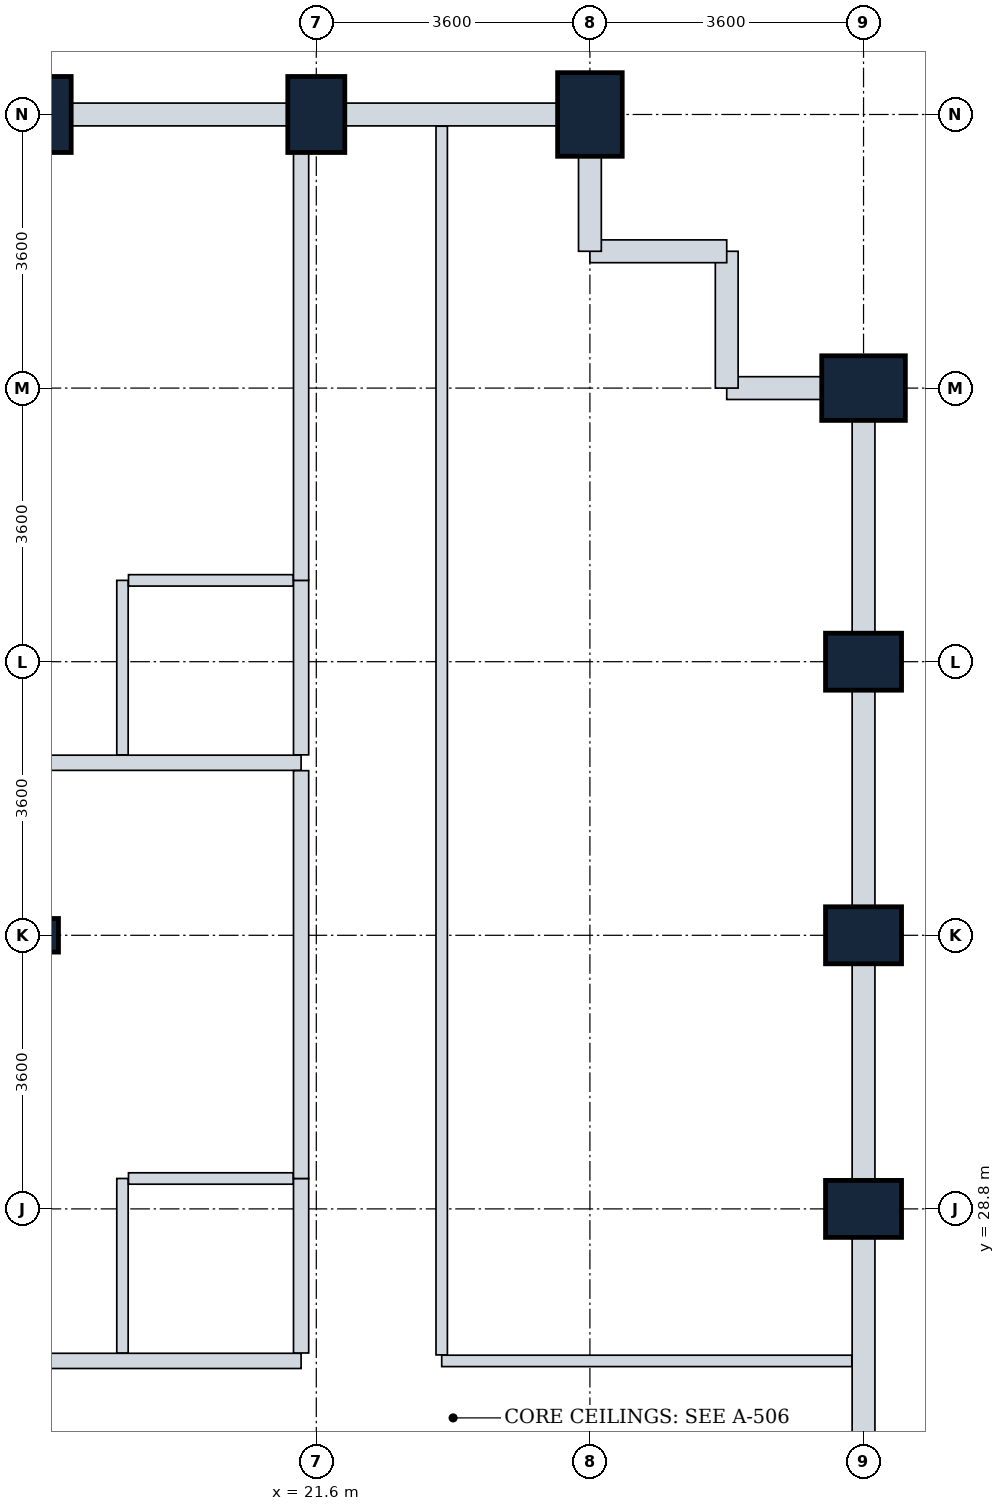
"""IFC4 building model, lengths in metres.
Left out: names, types, materials, properties, quantities, classifications, styles, units other than length and angle.
Written with IfcOpenShell. Run it as: python <this file> out.ifc"""

import sys

from ifc_helpers import new_model, si_unit, direction, frame, frame_2d, origin, origin_2d, place, context, subcontext, project, spatial, rectangle, i_section, extrude, element, fill, save


model = new_model("IFC4")
c1 = context("Model", 3, precision=1e-05, world=origin(), true_north=direction((0.0, 1.0)))
c2 = subcontext(c1, "Body", "Model", "MODEL_VIEW")
j1 = project(units=[si_unit("LENGTHUNIT", "METRE"), si_unit("PLANEANGLEUNIT", "RADIAN")], contexts=[c1])
p1 = place(None, origin())
s1 = spatial("IfcSite", under=j1, at=p1, CompositionType="ELEMENT")
p2 = place(p1, origin())
s2 = spatial("IfcBuilding", under=s1, at=p2, CompositionType="ELEMENT")
p3 = place(p2, frame((0.0, 0.0, 139.0)))
s3 = spatial("IfcBuildingStorey", under=s2, at=p3, CompositionType="ELEMENT", Elevation=139.0)
p4 = place(p3, frame((18.0, 32.4, 0.0), z_axis=(0.0, 0.0, 1.0), x_axis=(1.0, 0.0, 0.0)))
e1 = element("IfcColumn", 1, at=p4, inside=s3, PredefinedType="COLUMN", context=c2, shape_type="SweptSolid", body=[
    extrude(i_section(OverallWidth=0.416, OverallDepth=0.442, WebThickness=0.025, FlangeThickness=0.041, FilletRadius=0.015, at=origin_2d()), origin(), (0.0, 0.0, 1.0), 3.8),
])
for number, where, z_axis, x_axis in (
    (2, (18.0, 43.2, 0.0), (0.0, 0.0, 1.0), (1.0, 0.0, 0.0)),
    (3, (21.6, 43.2, 0.0), (0.0, 0.0, 1.0), (1.0, 0.0, 0.0)),
):
    element("IfcColumn", number, at=place(p3, frame(where, z_axis=z_axis, x_axis=x_axis)), inside=s3, PredefinedType="COLUMN", context=c2, shape_type="SweptSolid", body=[
        extrude(rectangle(XDim=0.75, YDim=1.0, at=origin_2d()), origin(), (0.0, 0.0, 1.0), 3.8),
    ])
p5 = place(p3, frame((25.2, 43.2, 0.0), z_axis=(0.0, 0.0, 1.0), x_axis=(1.0, 0.0, 0.0)))
e4 = element("IfcColumn", 4, at=p5, inside=s3, PredefinedType="COLUMN", context=c2, shape_type="SweptSolid", body=[
    extrude(rectangle(XDim=0.85, YDim=1.1, at=origin_2d()), origin(), (0.0, 0.0, 1.0), 3.8),
])
for number, where, z_axis, x_axis in (
    (5, (28.8, 28.8, 0.0), (0.0, 0.0, 1.0), (0.0, 1.0, 0.0)),
    (6, (28.8, 32.4, 0.0), (0.0, 0.0, 1.0), (0.0, 1.0, 0.0)),
    (7, (28.8, 36.0, 0.0), (0.0, 0.0, 1.0), (0.0, 1.0, 0.0)),
):
    element("IfcColumn", number, at=place(p3, frame(where, z_axis=z_axis, x_axis=x_axis)), inside=s3, PredefinedType="COLUMN", context=c2, shape_type="SweptSolid", body=[
        extrude(rectangle(XDim=0.75, YDim=1.0, at=origin_2d()), origin(), (0.0, 0.0, 1.0), 3.8),
    ])
p6 = place(p3, frame((28.8, 39.6, 0.0), z_axis=(0.0, 0.0, 1.0), x_axis=(0.0, 1.0, 0.0)))
e8 = element("IfcColumn", 8, at=p6, inside=s3, PredefinedType="COLUMN", context=c2, shape_type="SweptSolid", body=[
    extrude(rectangle(XDim=0.85, YDim=1.1, at=origin_2d()), origin(), (0.0, 0.0, 1.0), 3.8),
])
p7 = place(p3, frame((28.8, 28.8, 0.0), z_axis=(0.0, 0.0, 1.0), x_axis=(0.0, -1.0, 0.0)))
e9 = element("IfcWall", 9, at=p7, inside=s3, PredefinedType="STANDARD", context=c2, shape_type="SweptSolid", body=[
    extrude(rectangle(XDim=3.6, YDim=0.3, at=frame_2d((1.8, 0.0))), origin(), (0.0, 0.0, 1.0), 3.17),
])
p8 = place(p3, frame((28.8, 32.4, 0.0), z_axis=(0.0, 0.0, 1.0), x_axis=(0.0, -1.0, 0.0)))
e10 = element("IfcWall", 10, at=p8, inside=s3, PredefinedType="STANDARD", context=c2, shape_type="SweptSolid", body=[
    extrude(rectangle(XDim=3.6, YDim=0.3, at=frame_2d((1.8, 0.0))), origin(), (0.0, 0.0, 1.0), 2.93),
])
p9 = place(p8, frame((0.75, 0.0, 0.85)))
e11 = element("IfcOpeningElement", 11, at=p9, cuts=e10, PredefinedType="OPENING", context=c2, shape_type="SweptSolid", body=[
    extrude(rectangle(XDim=2.1, YDim=1.35, at=frame_2d((1.05, 0.675))), frame((0.0, 0.16, 0.0), z_axis=(0.0, -1.0, 0.0), x_axis=(1.0, 0.0, 0.0)), (0.0, 0.0, 1.0), 0.32),
])
p10 = place(p3, frame((28.8, 36.0, 0.0), z_axis=(0.0, 0.0, 1.0), x_axis=(0.0, -1.0, 0.0)))
e12 = element("IfcWall", 12, at=p10, inside=s3, PredefinedType="STANDARD", context=c2, shape_type="SweptSolid", body=[
    extrude(rectangle(XDim=3.6, YDim=0.3, at=frame_2d((1.8, 0.0))), origin(), (0.0, 0.0, 1.0), 2.93),
])
p11 = place(p10, frame((0.75, 0.0, 0.85)))
e13 = element("IfcOpeningElement", 13, at=p11, cuts=e12, PredefinedType="OPENING", context=c2, shape_type="SweptSolid", body=[
    extrude(rectangle(XDim=2.1, YDim=1.35, at=frame_2d((1.05, 0.675))), frame((0.0, 0.16, 0.0), z_axis=(0.0, -1.0, 0.0), x_axis=(1.0, 0.0, 0.0)), (0.0, 0.0, 1.0), 0.32),
])
p12 = place(p3, frame((28.8, 39.6, 0.0), z_axis=(0.0, 0.0, 1.0), x_axis=(0.0, -1.0, 0.0)))
e14 = element("IfcWall", 14, at=p12, inside=s3, PredefinedType="STANDARD", context=c2, shape_type="SweptSolid", body=[
    extrude(rectangle(XDim=3.6, YDim=0.3, at=frame_2d((1.8, 0.0))), origin(), (0.0, 0.0, 1.0), 2.93),
])
p13 = place(p12, frame((0.775, 0.0, 0.85)))
e15 = element("IfcOpeningElement", 15, at=p13, cuts=e14, PredefinedType="OPENING", context=c2, shape_type="SweptSolid", body=[
    extrude(rectangle(XDim=2.1, YDim=1.35, at=frame_2d((1.05, 0.675))), frame((0.0, 0.16, 0.0), z_axis=(0.0, -1.0, 0.0), x_axis=(1.0, 0.0, 0.0)), (0.0, 0.0, 1.0), 0.32),
])
p14 = place(p3, frame((27.0, 39.6, 0.0), z_axis=(0.0, 0.0, 1.0), x_axis=(1.0, 0.0, 0.0)))
e16 = element("IfcWall", 16, at=p14, inside=s3, PredefinedType="STANDARD", context=c2, shape_type="SweptSolid", body=[
    extrude(rectangle(XDim=1.8, YDim=0.3, at=frame_2d((0.9, 0.0))), origin(), (0.0, 0.0, 1.0), 2.93),
])
p15 = place(p3, frame((27.0, 39.6, 0.0), z_axis=(0.0, 0.0, 1.0), x_axis=(0.0, 1.0, 0.0)))
e17 = element("IfcWall", 17, at=p15, inside=s3, PredefinedType="STANDARD", context=c2, shape_type="SweptSolid", body=[
    extrude(rectangle(XDim=1.8, YDim=0.3, at=frame_2d((0.9, 0.0))), origin(), (0.0, 0.0, 1.0), 3.535),
])
p16 = place(p3, frame((25.2, 41.4, 0.0), z_axis=(0.0, 0.0, 1.0), x_axis=(1.0, 0.0, 0.0)))
e18 = element("IfcWall", 18, at=p16, inside=s3, PredefinedType="STANDARD", context=c2, shape_type="SweptSolid", body=[
    extrude(rectangle(XDim=1.8, YDim=0.3, at=frame_2d((0.9, 0.0))), origin(), (0.0, 0.0, 1.0), 3.535),
])
p17 = place(p3, frame((25.2, 41.4, 0.0), z_axis=(0.0, 0.0, 1.0), x_axis=(0.0, 1.0, 0.0)))
e19 = element("IfcWall", 19, at=p17, inside=s3, PredefinedType="STANDARD", context=c2, shape_type="SweptSolid", body=[
    extrude(rectangle(XDim=1.8, YDim=0.3, at=frame_2d((0.9, 0.0))), origin(), (0.0, 0.0, 1.0), 2.93),
])
p18 = place(p3, frame((21.6, 43.2, 0.0), z_axis=(0.0, 0.0, 1.0), x_axis=(1.0, 0.0, 0.0)))
e20 = element("IfcWall", 20, at=p18, inside=s3, PredefinedType="STANDARD", context=c2, shape_type="SweptSolid", body=[
    extrude(rectangle(XDim=3.6, YDim=0.3, at=frame_2d((1.8, 0.0))), origin(), (0.0, 0.0, 1.0), 2.93),
])
p19 = place(p3, frame((18.0, 43.2, 0.0), z_axis=(0.0, 0.0, 1.0), x_axis=(1.0, 0.0, 0.0)))
e21 = element("IfcWall", 21, at=p19, inside=s3, PredefinedType="STANDARD", context=c2, shape_type="SweptSolid", body=[
    extrude(rectangle(XDim=3.6, YDim=0.3, at=frame_2d((1.8, 0.0))), origin(), (0.0, 0.0, 1.0), 2.93),
])
p20 = place(p19, frame((0.75, 0.0, 0.85)))
e22 = element("IfcOpeningElement", 22, at=p20, cuts=e21, PredefinedType="OPENING", context=c2, shape_type="SweptSolid", body=[
    extrude(rectangle(XDim=2.1, YDim=1.35, at=frame_2d((1.05, 0.675))), frame((0.0, 0.16, 0.0), z_axis=(0.0, -1.0, 0.0), x_axis=(1.0, 0.0, 0.0)), (0.0, 0.0, 1.0), 0.32),
])
for number, where, z_axis, x_axis in (
    (23, (7.354, 26.8, 0.0), (0.0, 0.0, 1.0), (1.0, 0.0, 0.0)),
    (24, (7.354, 34.67, 0.0), (0.0, 0.0, 1.0), (1.0, 0.0, 0.0)),
):
    element("IfcWall", number, at=place(p3, frame(where, z_axis=z_axis, x_axis=x_axis)), inside=s3, PredefinedType="PARTITIONING", context=c2, shape_type="SweptSolid", body=[
        extrude(rectangle(XDim=14.046, YDim=0.2, at=frame_2d((7.023, 0.0))), origin(), (0.0, 0.0, 1.0), 2.93),
    ])
p21 = place(p3, frame((21.4, 26.904, 0.0), z_axis=(0.0, 0.0, 1.0), x_axis=(0.0, 1.0, 0.0)))
e25 = element("IfcWall", 25, at=p21, inside=s3, PredefinedType="PARTITIONING", context=c2, shape_type="SweptSolid", body=[
    extrude(rectangle(XDim=2.296, YDim=0.2, at=frame_2d((1.148, 0.0))), origin(), (0.0, 0.0, 1.0), 3.13),
])
p22 = place(p3, frame((19.05, 26.904, 0.0), z_axis=(0.0, 0.0, 1.0), x_axis=(0.0, 1.0, 0.0)))
e26 = element("IfcWall", 26, at=p22, inside=s3, PredefinedType="PARTITIONING", context=c2, shape_type="SweptSolid", body=[
    extrude(rectangle(XDim=2.296, YDim=0.15, at=frame_2d((1.148, 0.0))), origin(), (0.0, 0.0, 1.0), 3.17),
])
p23 = place(p3, frame((19.129, 29.2, 0.0), z_axis=(0.0, 0.0, 1.0), x_axis=(1.0, 0.0, 0.0)))
e27 = element("IfcWall", 27, at=p23, inside=s3, PredefinedType="PARTITIONING", context=c2, shape_type="SweptSolid", body=[
    extrude(rectangle(XDim=2.167, YDim=0.15, at=frame_2d((1.083, 0.0))), origin(), (0.0, 0.0, 1.0), 3.535),
])
p24 = place(p23, frame((0.641, 0.0, 0.0)))
e28 = element("IfcOpeningElement", 28, at=p24, cuts=e27, PredefinedType="OPENING", context=c2, shape_type="SweptSolid", body=[
    extrude(rectangle(XDim=0.85, YDim=2.1, at=frame_2d((0.425, 1.05))), frame((0.0, 0.085, 0.0), z_axis=(0.0, -1.0, 0.0), x_axis=(1.0, 0.0, 0.0)), (0.0, 0.0, 1.0), 0.17),
])
p25 = place(p3, frame((21.4, 29.2, 0.0), z_axis=(0.0, 0.0, 1.0), x_axis=(0.0, 1.0, 0.0)))
e29 = element("IfcWall", 29, at=p25, inside=s3, PredefinedType="PARTITIONING", context=c2, shape_type="SweptSolid", body=[
    extrude(rectangle(XDim=5.366, YDim=0.2, at=frame_2d((2.683, 0.0))), origin(), (0.0, 0.0, 1.0), 3.13),
])
p26 = place(p25, frame((1.557, 0.0, 0.0)))
e30 = element("IfcOpeningElement", 30, at=p26, cuts=e29, PredefinedType="OPENING", context=c2, shape_type="SweptSolid", body=[
    extrude(rectangle(XDim=1.0, YDim=2.1, at=frame_2d((0.5, 1.05))), frame((0.0, 0.11, 0.0), z_axis=(0.0, -1.0, 0.0), x_axis=(1.0, 0.0, 0.0)), (0.0, 0.0, 1.0), 0.22),
])
p27 = place(p3, frame((21.4, 34.774, 0.0), z_axis=(0.0, 0.0, 1.0), x_axis=(0.0, 1.0, 0.0)))
e31 = element("IfcWall", 31, at=p27, inside=s3, PredefinedType="PARTITIONING", context=c2, shape_type="SweptSolid", body=[
    extrude(rectangle(XDim=2.296, YDim=0.2, at=frame_2d((1.148, 0.0))), origin(), (0.0, 0.0, 1.0), 3.17),
])
p28 = place(p3, frame((19.05, 34.774, 0.0), z_axis=(0.0, 0.0, 1.0), x_axis=(0.0, 1.0, 0.0)))
e32 = element("IfcWall", 32, at=p28, inside=s3, PredefinedType="PARTITIONING", context=c2, shape_type="SweptSolid", body=[
    extrude(rectangle(XDim=2.296, YDim=0.15, at=frame_2d((1.148, 0.0))), origin(), (0.0, 0.0, 1.0), 3.17),
])
p29 = place(p3, frame((19.129, 37.07, 0.0), z_axis=(0.0, 0.0, 1.0), x_axis=(1.0, 0.0, 0.0)))
e33 = element("IfcWall", 33, at=p29, inside=s3, PredefinedType="PARTITIONING", context=c2, shape_type="SweptSolid", body=[
    extrude(rectangle(XDim=2.167, YDim=0.15, at=frame_2d((1.083, 0.0))), origin(), (0.0, 0.0, 1.0), 3.535),
])
p30 = place(p29, frame((0.641, 0.0, 0.0)))
e34 = element("IfcOpeningElement", 34, at=p30, cuts=e33, PredefinedType="OPENING", context=c2, shape_type="SweptSolid", body=[
    extrude(rectangle(XDim=0.85, YDim=2.1, at=frame_2d((0.425, 1.05))), frame((0.0, 0.085, 0.0), z_axis=(0.0, -1.0, 0.0), x_axis=(1.0, 0.0, 0.0)), (0.0, 0.0, 1.0), 0.17),
])
p31 = place(p3, frame((21.4, 37.07, 0.0), z_axis=(0.0, 0.0, 1.0), x_axis=(0.0, 1.0, 0.0)))
e35 = element("IfcWall", 35, at=p31, inside=s3, PredefinedType="PARTITIONING", context=c2, shape_type="SweptSolid", body=[
    extrude(rectangle(XDim=5.976, YDim=0.2, at=frame_2d((2.988, 0.0))), origin(), (0.0, 0.0, 1.0), 2.93),
])
p32 = place(p31, frame((1.226, 0.0, 0.0)))
e36 = element("IfcOpeningElement", 36, at=p32, cuts=e35, PredefinedType="OPENING", context=c2, shape_type="SweptSolid", body=[
    extrude(rectangle(XDim=1.0, YDim=2.1, at=frame_2d((0.5, 1.05))), frame((0.0, 0.11, 0.0), z_axis=(0.0, -1.0, 0.0), x_axis=(1.0, 0.0, 0.0)), (0.0, 0.0, 1.0), 0.22),
])
p33 = place(p3, frame((23.25, 26.8, 0.0), z_axis=(0.0, 0.0, 1.0), x_axis=(1.0, 0.0, 0.0)))
e37 = element("IfcWall", 37, at=p33, inside=s3, PredefinedType="PARTITIONING", context=c2, shape_type="SweptSolid", body=[
    extrude(rectangle(XDim=5.396, YDim=0.15, at=frame_2d((2.698, 0.0))), origin(), (0.0, 0.0, 1.0), 3.535),
])
p34 = place(p3, frame((23.25, 26.879, 0.0), z_axis=(0.0, 0.0, 1.0), x_axis=(0.0, 1.0, 0.0)))
e38 = element("IfcWall", 38, at=p34, inside=s3, PredefinedType="PARTITIONING", context=c2, shape_type="SweptSolid", body=[
    extrude(rectangle(XDim=16.167, YDim=0.15, at=frame_2d((8.083, 0.0))), origin(), (0.0, 0.0, 1.0), 2.93),
])
p35 = place(p34, frame((7.621, 0.0, 0.0)))
e39 = element("IfcOpeningElement", 39, at=p35, cuts=e38, PredefinedType="OPENING", context=c2, shape_type="SweptSolid", body=[
    extrude(rectangle(XDim=1.0, YDim=2.1, at=frame_2d((0.5, 1.05))), frame((0.0, 0.085, 0.0), z_axis=(0.0, -1.0, 0.0), x_axis=(1.0, 0.0, 0.0)), (0.0, 0.0, 1.0), 0.17),
])
p36 = place(p9, origin())
e40 = element("IfcWindow", 40, at=p36, inside=s3, PartitioningType="SINGLE_PANEL", PredefinedType="WINDOW", context=c2, shape_type="SweptSolid", body=[
    extrude(rectangle(XDim=2.1, YDim=1.35, at=frame_2d((1.05, 0.675))), frame((0.0, 0.03, 0.0), z_axis=(0.0, -1.0, 0.0), x_axis=(1.0, 0.0, 0.0)), (0.0, 0.0, 1.0), 0.06),
])
fill(e11, e40)
p37 = place(p11, origin())
e41 = element("IfcWindow", 41, at=p37, inside=s3, PartitioningType="SINGLE_PANEL", PredefinedType="WINDOW", context=c2, shape_type="SweptSolid", body=[
    extrude(rectangle(XDim=2.1, YDim=1.35, at=frame_2d((1.05, 0.675))), frame((0.0, 0.03, 0.0), z_axis=(0.0, -1.0, 0.0), x_axis=(1.0, 0.0, 0.0)), (0.0, 0.0, 1.0), 0.06),
])
fill(e13, e41)
p38 = place(p13, origin())
e42 = element("IfcWindow", 42, at=p38, inside=s3, PartitioningType="SINGLE_PANEL", PredefinedType="WINDOW", context=c2, shape_type="SweptSolid", body=[
    extrude(rectangle(XDim=2.1, YDim=1.35, at=frame_2d((1.05, 0.675))), frame((0.0, 0.03, 0.0), z_axis=(0.0, -1.0, 0.0), x_axis=(1.0, 0.0, 0.0)), (0.0, 0.0, 1.0), 0.06),
])
fill(e15, e42)
p39 = place(p20, origin())
e43 = element("IfcWindow", 43, at=p39, inside=s3, PartitioningType="SINGLE_PANEL", PredefinedType="WINDOW", context=c2, shape_type="SweptSolid", body=[
    extrude(rectangle(XDim=2.1, YDim=1.35, at=frame_2d((1.05, 0.675))), frame((0.0, 0.03, 0.0), z_axis=(0.0, -1.0, 0.0), x_axis=(1.0, 0.0, 0.0)), (0.0, 0.0, 1.0), 0.06),
])
fill(e22, e43)
p40 = place(p24, origin())
e44 = element("IfcDoor", 44, at=p40, inside=s3, OperationType="SINGLE_SWING_RIGHT", PredefinedType="DOOR", context=c2, shape_type="SweptSolid", body=[
    extrude(rectangle(XDim=0.85, YDim=2.1, at=frame_2d((0.425, 1.05))), frame((0.0, 0.025, 0.0), z_axis=(0.0, -1.0, 0.0), x_axis=(1.0, 0.0, 0.0)), (0.0, 0.0, 1.0), 0.05),
])
fill(e28, e44)
p41 = place(p26, origin())
e45 = element("IfcDoor", 45, at=p41, inside=s3, OperationType="SINGLE_SWING_LEFT", PredefinedType="DOOR", context=c2, shape_type="SweptSolid", body=[
    extrude(rectangle(XDim=1.0, YDim=2.1, at=frame_2d((0.5, 1.05))), frame((0.0, 0.025, 0.0), z_axis=(0.0, -1.0, 0.0), x_axis=(1.0, 0.0, 0.0)), (0.0, 0.0, 1.0), 0.05),
])
fill(e30, e45)
p42 = place(p30, origin())
e46 = element("IfcDoor", 46, at=p42, inside=s3, OperationType="SINGLE_SWING_RIGHT", PredefinedType="DOOR", context=c2, shape_type="SweptSolid", body=[
    extrude(rectangle(XDim=0.85, YDim=2.1, at=frame_2d((0.425, 1.05))), frame((0.0, 0.025, 0.0), z_axis=(0.0, -1.0, 0.0), x_axis=(1.0, 0.0, 0.0)), (0.0, 0.0, 1.0), 0.05),
])
fill(e34, e46)
p43 = place(p32, origin())
e47 = element("IfcDoor", 47, at=p43, inside=s3, OperationType="SINGLE_SWING_LEFT", PredefinedType="DOOR", context=c2, shape_type="SweptSolid", body=[
    extrude(rectangle(XDim=1.0, YDim=2.1, at=frame_2d((0.5, 1.05))), frame((0.0, 0.025, 0.0), z_axis=(0.0, -1.0, 0.0), x_axis=(1.0, 0.0, 0.0)), (0.0, 0.0, 1.0), 0.05),
])
fill(e36, e47)
p44 = place(p35, origin())
e48 = element("IfcDoor", 48, at=p44, inside=s3, OperationType="SINGLE_SWING_LEFT", PredefinedType="DOOR", context=c2, shape_type="SweptSolid", body=[
    extrude(rectangle(XDim=1.0, YDim=2.1, at=frame_2d((0.5, 1.05))), frame((0.0, 0.025, 0.0), z_axis=(0.0, -1.0, 0.0), x_axis=(1.0, 0.0, 0.0)), (0.0, 0.0, 1.0), 0.05),
])
fill(e39, e48)
save(model, sys.argv[1])
